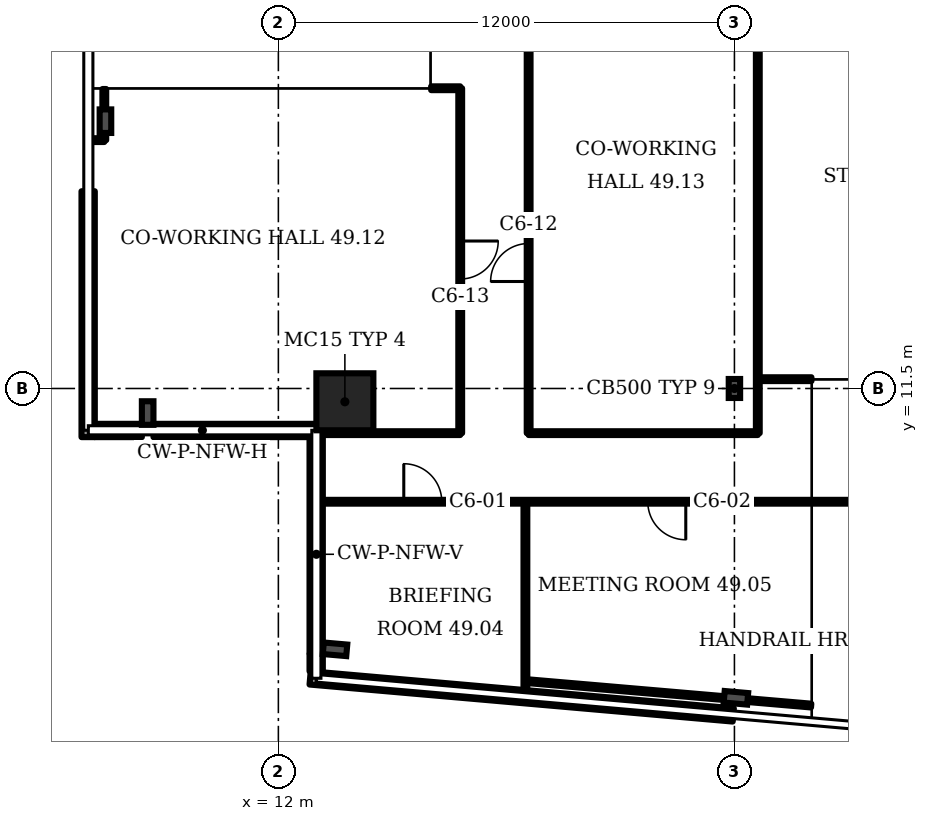
"""IFC4 building model, lengths in metres.
Left out: names, types, materials, properties, quantities, classifications, styles, units other than length and angle.
Written with IfcOpenShell. Run it as: python <this file> out.ifc"""

import sys

from ifc_helpers import new_model, si_unit, direction, frame, frame_2d, origin, origin_2d, place, context, subcontext, project, spatial, rectangle, i_section, extrude, element, fill, save


model = new_model("IFC4")
c1 = context("Model", 3, precision=1e-05, world=origin(), true_north=direction((0.0, 1.0)))
c2 = subcontext(c1, "Body", "Model", "MODEL_VIEW")
j1 = project(units=[si_unit("LENGTHUNIT", "METRE"), si_unit("PLANEANGLEUNIT", "RADIAN")], contexts=[c1])
p1 = place(None, origin())
s1 = spatial("IfcSite", under=j1, at=p1, CompositionType="ELEMENT")
p2 = place(p1, origin())
s2 = spatial("IfcBuilding", under=s1, at=p2, CompositionType="ELEMENT")
p3 = place(p2, frame((0.0, 0.0, 198.7)))
s3 = spatial("IfcBuildingStorey", under=s2, at=p3, CompositionType="ELEMENT", Elevation=198.7)
p4 = place(p3, frame((13.75, 11.15, 0.0), z_axis=(0.0, 0.0, 1.0), x_axis=(1.0, 0.0, 0.0)))
e1 = element("IfcColumn", 1, at=p4, inside=s3, PredefinedType="COLUMN", context=c2, shape_type="SweptSolid", body=[
    extrude(rectangle(XDim=1.5, YDim=1.5, at=origin_2d()), origin(), (0.0, 0.0, 1.0), 3.6),
])
for number, where, z_axis, x_axis in (
    (2, (13.491, 4.637, 0.0), (0.0, 0.0, 1.0), (-0.087, -0.996, 0.0)),
    (3, (24.039, 3.361, 0.0), (0.0, 0.0, 1.0), (-0.087, -0.996, 0.0)),
    (4, (7.45, 18.533, 0.0), (0.0, 0.0, 1.0), (-1.0, 0.0, 0.0)),
    (5, (8.561, 10.854, 0.0), (0.0, 0.0, 1.0), (-1.0, 0.0, 0.0)),
):
    element("IfcColumn", number, at=place(p3, frame(where, z_axis=z_axis, x_axis=x_axis)), inside=s3, PredefinedType="COLUMN", context=c2, shape_type="SweptSolid", body=[
        extrude(i_section(OverallWidth=0.305, OverallDepth=0.62, WebThickness=0.021, FlangeThickness=0.04, FilletRadius=0.027, at=origin_2d()), origin(), (0.0, 0.0, 1.0), 3.6),
    ])
p5 = place(p3, frame((24.0, 11.5, 0.0), z_axis=(0.0, 0.0, 1.0), x_axis=(1.0, 0.0, 0.0)))
e6 = element("IfcColumn", 6, at=p5, inside=s3, PredefinedType="COLUMN", context=c2, shape_type="SweptSolid", body=[
    extrude(i_section(OverallWidth=0.3, OverallDepth=0.5, WebThickness=0.014, FlangeThickness=0.028, FilletRadius=0.027, at=origin_2d()), origin(), (0.0, 0.0, 1.0), 3.6),
])
p6 = place(p3, frame((12.835, 3.885, 0.0), z_axis=(0.0, 0.0, 1.0), x_axis=(0.996199, -0.087154, 0.0)))
e7 = element("IfcWall", 7, at=p6, inside=s3, PredefinedType="SOLIDWALL", context=c2, shape_type="SweptSolid", body=[
    extrude(rectangle(XDim=11.177, YDim=0.35, at=frame_2d((5.588, 0.0))), origin(), (0.0, 0.0, 1.0), 1.0),
])
p7 = place(p3, frame((6.995, 16.69, 0.0), z_axis=(0.0, 0.0, 1.0), x_axis=(0.0, -1.0, 0.0)))
e8 = element("IfcWall", 8, at=p7, inside=s3, PredefinedType="SOLIDWALL", context=c2, shape_type="SweptSolid", body=[
    extrude(rectangle(XDim=6.47, YDim=0.35, at=frame_2d((3.235, 0.0))), origin(), (0.0, 0.0, 1.0), 1.0),
])
p8 = place(p3, frame((7.17, 10.395, 0.0), z_axis=(0.0, 0.0, 1.0), x_axis=(1.0, 0.0, 0.0)))
e9 = element("IfcWall", 9, at=p8, inside=s3, PredefinedType="SOLIDWALL", context=c2, shape_type="SweptSolid", body=[
    extrude(rectangle(XDim=1.238, YDim=0.35, at=frame_2d((0.619, 0.0))), origin(), (0.0, 0.0, 1.0), 1.0),
])
p9 = place(p3, frame((8.713, 10.395, 0.0), z_axis=(0.0, 0.0, 1.0), x_axis=(1.0, 0.0, 0.0)))
e10 = element("IfcWall", 10, at=p9, inside=s3, PredefinedType="SOLIDWALL", context=c2, shape_type="SweptSolid", body=[
    extrude(rectangle(XDim=4.287, YDim=0.35, at=frame_2d((2.143, 0.0))), origin(), (0.0, 0.0, 1.0), 1.0),
])
p10 = place(p3, frame((12.995, 10.22, 0.0), z_axis=(0.0, 0.0, 1.0), x_axis=(0.0, -1.0, 0.0)))
e11 = element("IfcWall", 11, at=p10, inside=s3, PredefinedType="SOLIDWALL", context=c2, shape_type="SweptSolid", body=[
    extrude(rectangle(XDim=5.693, YDim=0.35, at=frame_2d((2.847, 0.0))), origin(), (0.0, 0.0, 1.0), 1.0),
])
p11 = place(p3, frame((12.995, 4.512, 0.0), z_axis=(0.0, 0.0, 1.0), x_axis=(0.0, -1.0, 0.0)))
e12 = element("IfcWall", 12, at=p11, inside=s3, PredefinedType="SOLIDWALL", context=c2, shape_type="SweptSolid", body=[
    extrude(rectangle(XDim=0.454, YDim=0.35, at=frame_2d((0.227, 0.0))), origin(), (0.0, 0.0, 1.0), 1.0),
])
p12 = place(p3, frame((7.02, 18.035, 0.0), z_axis=(0.0, 0.0, 1.0), x_axis=(1.0, 0.0, 0.0)))
e13 = element("IfcWall", 13, at=p12, inside=s3, PredefinedType="PARTITIONING", context=c2, shape_type="SweptSolid", body=[
    extrude(rectangle(XDim=0.4, YDim=0.1, at=frame_2d((0.2, 0.0))), origin(), (0.0, 0.0, 1.0), 3.15),
])
p13 = place(p3, frame((7.42, 18.035, 0.0), z_axis=(0.0, 0.0, 1.0), x_axis=(0.0, 1.0, 0.0)))
e14 = element("IfcWall", 14, at=p13, inside=s3, PredefinedType="PARTITIONING", context=c2, shape_type="SweptSolid", body=[
    extrude(rectangle(XDim=1.345, YDim=0.1, at=frame_2d((0.672, 0.0))), origin(), (0.0, 0.0, 1.0), 2.53),
])
p14 = place(p3, frame((13.02, 8.52, 0.0), z_axis=(0.0, 0.0, 1.0), x_axis=(1.0, 0.0, 0.0)))
e15 = element("IfcWall", 15, at=p14, inside=s3, PredefinedType="PARTITIONING", context=c2, shape_type="SweptSolid", body=[
    extrude(rectangle(XDim=14.344, YDim=0.1, at=frame_2d((7.172, 0.0))), origin(), (0.0, 0.0, 1.0), 3.15),
])
p15 = place(p14, frame((2.28, 0.0, 0.0)))
e16 = element("IfcOpeningElement", 16, at=p15, cuts=e15, PredefinedType="OPENING", context=c2, shape_type="SweptSolid", body=[
    extrude(rectangle(XDim=1.0, YDim=2.1, at=frame_2d((0.5, 1.05))), frame((0.0, 0.06, 0.0), z_axis=(0.0, -1.0, 0.0), x_axis=(1.0, 0.0, 0.0)), (0.0, 0.0, 1.0), 0.12),
])
p16 = place(p14, frame((8.7, 0.0, 0.0)))
e17 = element("IfcOpeningElement", 17, at=p16, cuts=e15, PredefinedType="OPENING", context=c2, shape_type="SweptSolid", body=[
    extrude(rectangle(XDim=1.0, YDim=2.1, at=frame_2d((0.5, 1.05))), frame((0.0, 0.06, 0.0), z_axis=(0.0, -1.0, 0.0), x_axis=(1.0, 0.0, 0.0)), (0.0, 0.0, 1.0), 0.12),
])
p17 = place(p3, frame((13.02, 10.325, 0.0), z_axis=(0.0, 0.0, 1.0), x_axis=(1.0, 0.0, 0.0)))
e18 = element("IfcWall", 18, at=p17, inside=s3, PredefinedType="PARTITIONING", context=c2, shape_type="SweptSolid", body=[
    extrude(rectangle(XDim=3.765, YDim=0.1, at=frame_2d((1.882, 0.0))), origin(), (0.0, 0.0, 1.0), 3.15),
])
p18 = place(p3, frame((16.02, 19.4, 0.0), z_axis=(0.0, 0.0, 1.0), x_axis=(1.0, 0.0, 0.0)))
e19 = element("IfcWall", 19, at=p18, inside=s3, PredefinedType="PARTITIONING", context=c2, shape_type="SweptSolid", body=[
    extrude(rectangle(XDim=0.765, YDim=0.1, at=frame_2d((0.382, 0.0))), origin(), (0.0, 0.0, 1.0), 3.15),
])
p19 = place(p3, frame((16.785, 10.325, 0.0), z_axis=(0.0, 0.0, 1.0), x_axis=(0.0, 1.0, 0.0)))
e20 = element("IfcWall", 20, at=p19, inside=s3, PredefinedType="PARTITIONING", context=c2, shape_type="SweptSolid", body=[
    extrude(rectangle(XDim=9.075, YDim=0.1, at=frame_2d((4.538, 0.0))), origin(), (0.0, 0.0, 1.0), 3.15),
])
p20 = place(p19, frame((4.055, 0.0, 0.0)))
e21 = element("IfcOpeningElement", 21, at=p20, cuts=e20, PredefinedType="OPENING", context=c2, shape_type="SweptSolid", body=[
    extrude(rectangle(XDim=1.0, YDim=2.1, at=frame_2d((0.5, 1.05))), frame((0.0, 0.06, 0.0), z_axis=(0.0, -1.0, 0.0), x_axis=(1.0, 0.0, 0.0)), (0.0, 0.0, 1.0), 0.12),
])
p21 = place(p3, frame((18.5, 3.425, 0.0), z_axis=(0.0, 0.0, 1.0), x_axis=(0.0, 1.0, 0.0)))
e22 = element("IfcWall", 22, at=p21, inside=s3, PredefinedType="PARTITIONING", context=c2, shape_type="SweptSolid", body=[
    extrude(rectangle(XDim=5.095, YDim=0.1, at=frame_2d((2.547, 0.0))), origin(), (0.0, 0.0, 1.0), 2.53),
])
p22 = place(p3, frame((18.585, 10.325, 0.0), z_axis=(0.0, 0.0, 1.0), x_axis=(0.0, 1.0, 0.0)))
e23 = element("IfcWall", 23, at=p22, inside=s3, PredefinedType="PARTITIONING", context=c2, shape_type="SweptSolid", body=[
    extrude(rectangle(XDim=10.21, YDim=0.1, at=frame_2d((5.105, 0.0))), origin(), (0.0, 0.0, 1.0), 3.15),
])
p23 = place(p22, frame((3.99, 0.0, 0.0)))
e24 = element("IfcOpeningElement", 24, at=p23, cuts=e23, PredefinedType="OPENING", context=c2, shape_type="SweptSolid", body=[
    extrude(rectangle(XDim=1.0, YDim=2.1, at=frame_2d((0.5, 1.05))), frame((0.0, 0.06, 0.0), z_axis=(0.0, -1.0, 0.0), x_axis=(1.0, 0.0, 0.0)), (0.0, 0.0, 1.0), 0.12),
])
p24 = place(p3, frame((18.585, 10.325, 0.0), z_axis=(0.0, 0.0, 1.0), x_axis=(1.0, 0.0, 0.0)))
e25 = element("IfcWall", 25, at=p24, inside=s3, PredefinedType="PARTITIONING", context=c2, shape_type="SweptSolid", body=[
    extrude(rectangle(XDim=6.03, YDim=0.1, at=frame_2d((3.015, 0.0))), origin(), (0.0, 0.0, 1.0), 3.15),
])
p25 = place(p3, frame((24.615, 10.325, 0.0), z_axis=(0.0, 0.0, 1.0), x_axis=(0.0, 1.0, 0.0)))
e26 = element("IfcWall", 26, at=p25, inside=s3, PredefinedType="PARTITIONING", context=c2, shape_type="SweptSolid", body=[
    extrude(rectangle(XDim=10.21, YDim=0.1, at=frame_2d((5.105, 0.0))), origin(), (0.0, 0.0, 1.0), 3.15),
])
p26 = place(p3, frame((24.62, 11.745, 0.0), z_axis=(0.0, 0.0, 1.0), x_axis=(1.0, 0.0, 0.0)))
e27 = element("IfcWall", 27, at=p26, inside=s3, PredefinedType="PARTITIONING", context=c2, shape_type="SweptSolid", body=[
    extrude(rectangle(XDim=1.407, YDim=0.1, at=frame_2d((0.703, 0.0))), origin(), (0.0, 0.0, 1.0), 3.15),
])
p27 = place(p3, frame((26.019, 3.157, 0.0), z_axis=(0.0, 0.0, 1.0), x_axis=(-0.996318, 0.085696, 0.0)))
e28 = element("IfcWall", 28, at=p27, inside=s3, PredefinedType="PARTITIONING", context=c2, shape_type="SweptSolid", body=[
    extrude(rectangle(XDim=7.507, YDim=0.1, at=frame_2d((3.753, 0.0))), origin(), (0.0, 0.0, 1.0), 2.53),
])
p28 = place(p15, origin())
e29 = element("IfcDoor", 29, at=p28, inside=s3, OperationType="SINGLE_SWING_LEFT", PredefinedType="DOOR", context=c2, shape_type="SweptSolid", body=[
    extrude(rectangle(XDim=1.0, YDim=2.1, at=frame_2d((0.5, 1.05))), frame((0.0, 0.025, 0.0), z_axis=(0.0, -1.0, 0.0), x_axis=(1.0, 0.0, 0.0)), (0.0, 0.0, 1.0), 0.05),
])
fill(e16, e29)
p29 = place(p16, origin())
e30 = element("IfcDoor", 30, at=p29, inside=s3, OperationType="SINGLE_SWING_RIGHT", PredefinedType="DOOR", context=c2, shape_type="SweptSolid", body=[
    extrude(rectangle(XDim=1.0, YDim=2.1, at=frame_2d((0.5, 1.05))), frame((0.0, 0.025, 0.0), z_axis=(0.0, -1.0, 0.0), x_axis=(1.0, 0.0, 0.0)), (0.0, 0.0, 1.0), 0.05),
])
fill(e17, e30)
p30 = place(p23, origin())
e31 = element("IfcDoor", 31, at=p30, inside=s3, OperationType="SINGLE_SWING_LEFT", PredefinedType="DOOR", context=c2, shape_type="SweptSolid", body=[
    extrude(rectangle(XDim=1.0, YDim=2.1, at=frame_2d((0.5, 1.05))), frame((0.0, 0.025, 0.0), z_axis=(0.0, -1.0, 0.0), x_axis=(1.0, 0.0, 0.0)), (0.0, 0.0, 1.0), 0.05),
])
fill(e24, e31)
p31 = place(p20, origin())
e32 = element("IfcDoor", 32, at=p31, inside=s3, OperationType="SINGLE_SWING_RIGHT", PredefinedType="DOOR", context=c2, shape_type="SweptSolid", body=[
    extrude(rectangle(XDim=1.0, YDim=2.1, at=frame_2d((0.5, 1.05))), frame((0.0, 0.025, 0.0), z_axis=(0.0, -1.0, 0.0), x_axis=(1.0, 0.0, 0.0)), (0.0, 0.0, 1.0), 0.05),
])
fill(e21, e32)
save(model, sys.argv[1])
